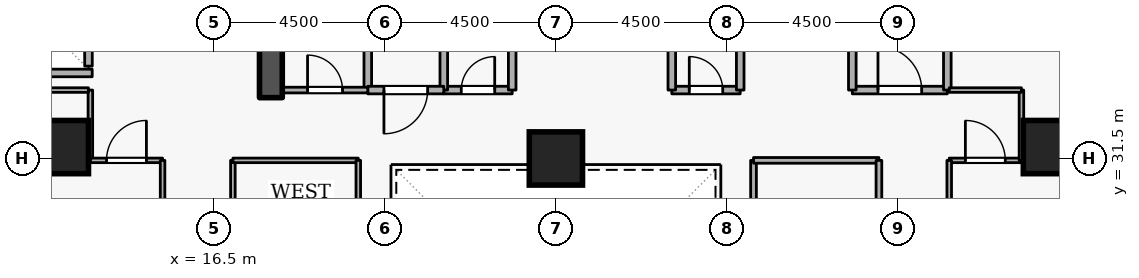
"""IFC4 building model, lengths in metres.
Left out: names, types, materials, properties, quantities, classifications, styles, units other than length and angle.
Written with IfcOpenShell. Run it as: python <this file> out.ifc"""

import sys

from ifc_helpers import new_model, si_unit, direction, frame, frame_2d, origin, origin_2d, place, context, subcontext, project, spatial, rectangle, extrude, element, fill, save


model = new_model("IFC4")
c1 = context("Model", 3, precision=1e-05, world=origin(), true_north=direction((0.0, 1.0)))
c2 = subcontext(c1, "Body", "Model", "MODEL_VIEW")
j1 = project(units=[si_unit("LENGTHUNIT", "METRE"), si_unit("PLANEANGLEUNIT", "RADIAN")], contexts=[c1])
p1 = place(None, origin())
s1 = spatial("IfcSite", under=j1, at=p1, CompositionType="ELEMENT")
p2 = place(p1, origin())
s2 = spatial("IfcBuilding", under=s1, at=p2, CompositionType="ELEMENT")
p3 = place(p2, frame((0.0, 0.0, 38.7)))
s3 = spatial("IfcBuildingStorey", under=s2, at=p3, CompositionType="ELEMENT", Elevation=38.7)
p4 = place(p3, frame((18.0, 33.1, 0.0), z_axis=(0.0, 0.0, 1.0), x_axis=(0.0, 1.0, 0.0)))
e1 = element("IfcWall", 1, at=p4, inside=s3, PredefinedType="SHEAR", context=c2, shape_type="SweptSolid", body=[
    extrude(rectangle(XDim=5.7, YDim=0.6, at=frame_2d((2.85, 0.0))), origin(), (0.0, 0.0, 1.0), 3.6),
])
for number, where, z_axis, x_axis in (
    (2, (12.5, 31.8, 0.0), (0.0, 0.0, 1.0), (1.0, 0.0, 0.0)),
    (3, (38.5, 31.8, 0.0), (0.0, 0.0, 1.0), (1.0, 0.0, 0.0)),
    (4, (25.5, 31.5, 0.0), (0.0, 0.0, 1.0), (1.0, 0.0, 0.0)),
):
    element("IfcColumn", number, at=place(p3, frame(where, z_axis=z_axis, x_axis=x_axis)), inside=s3, PredefinedType="COLUMN", context=c2, shape_type="SweptSolid", body=[
        extrude(rectangle(XDim=1.4, YDim=1.4, at=origin_2d()), origin(), (0.0, 0.0, 1.0), 3.6),
    ])
p5 = place(p3, frame((13.2, 33.93, 0.0), z_axis=(0.0, 0.0, 1.0), x_axis=(0.0, 1.0, 0.0)))
e5 = element("IfcWall", 5, at=p5, inside=s3, PredefinedType="STANDARD", context=c2, shape_type="SweptSolid", body=[
    extrude(rectangle(XDim=1.94, YDim=0.2, at=frame_2d((0.97, 0.0))), origin(), (0.0, 0.0, 1.0), 3.34),
])
p6 = place(p3, frame((11.002, 33.75, 0.0), z_axis=(0.0, 0.0, 1.0), x_axis=(1.0, 0.0, 0.0)))
e6 = element("IfcWall", 6, at=p6, inside=s3, PredefinedType="STANDARD", context=c2, shape_type="SweptSolid", body=[
    extrude(rectangle(XDim=2.296, YDim=0.2, at=frame_2d((1.148, 0.0))), origin(), (0.0, 0.0, 1.0), 3.34),
])
p7 = place(p3, frame((33.3, 33.3, 0.0), z_axis=(0.0, 0.0, 1.0), x_axis=(1.0, 0.0, 0.0)))
e7 = element("IfcWall", 7, at=p7, inside=s3, PredefinedType="STANDARD", context=c2, shape_type="SweptSolid", body=[
    extrude(rectangle(XDim=2.5, YDim=0.2, at=frame_2d((1.25, 0.0))), origin(), (0.0, 0.0, 1.0), 3.34),
])
p8 = place(p7, frame((0.675, 0.0, 0.0)))
e8 = element("IfcOpeningElement", 8, at=p8, cuts=e7, PredefinedType="OPENING", context=c2, shape_type="SweptSolid", body=[
    extrude(rectangle(XDim=1.15, YDim=2.1, at=frame_2d((0.575, 1.05))), frame((0.0, 0.11, 0.0), z_axis=(0.0, -1.0, 0.0), x_axis=(1.0, 0.0, 0.0)), (0.0, 0.0, 1.0), 0.22),
])
p9 = place(p3, frame((35.8, 33.3, 0.0), z_axis=(0.0, 0.0, 1.0), x_axis=(0.0, 1.0, 0.0)))
e9 = element("IfcWall", 9, at=p9, inside=s3, PredefinedType="STANDARD", context=c2, shape_type="SweptSolid", body=[
    extrude(rectangle(XDim=5.7, YDim=0.2, at=frame_2d((2.85, 0.0))), origin(), (0.0, 0.0, 1.0), 3.34),
])
p10 = place(p3, frame((33.3, 35.6, 0.0), z_axis=(0.0, 0.0, 1.0), x_axis=(0.0, -1.0, 0.0)))
e10 = element("IfcWall", 10, at=p10, inside=s3, PredefinedType="STANDARD", context=c2, shape_type="SweptSolid", body=[
    extrude(rectangle(XDim=2.3, YDim=0.2, at=frame_2d((1.15, 0.0))), origin(), (0.0, 0.0, 1.0), 2.545),
])
p11 = place(p3, frame((22.55, 33.3, 0.0), z_axis=(0.0, 0.0, 1.0), x_axis=(1.0, 0.0, 0.0)))
e11 = element("IfcWall", 11, at=p11, inside=s3, PredefinedType="STANDARD", context=c2, shape_type="SweptSolid", body=[
    extrude(rectangle(XDim=1.8, YDim=0.2, at=frame_2d((0.9, 0.0))), origin(), (0.0, 0.0, 1.0), 3.34),
])
p12 = place(p11, frame((0.46, 0.0, 0.0)))
e12 = element("IfcOpeningElement", 12, at=p12, cuts=e11, PredefinedType="OPENING", context=c2, shape_type="SweptSolid", body=[
    extrude(rectangle(XDim=0.88, YDim=2.04, at=frame_2d((0.44, 1.02))), frame((0.0, 0.11, 0.0), z_axis=(0.0, -1.0, 0.0), x_axis=(1.0, 0.0, 0.0)), (0.0, 0.0, 1.0), 0.22),
])
for number, where, z_axis, x_axis in (
    (13, (24.35, 33.3, 0.0), (0.0, 0.0, 1.0), (0.0, 1.0, 0.0)),
    (14, (22.55, 35.35, 0.0), (0.0, 0.0, 1.0), (0.0, -1.0, 0.0)),
):
    element("IfcWall", number, at=place(p3, frame(where, z_axis=z_axis, x_axis=x_axis)), inside=s3, PredefinedType="STANDARD", context=c2, shape_type="SweptSolid", body=[
        extrude(rectangle(XDim=2.05, YDim=0.2, at=frame_2d((1.025, 0.0))), origin(), (0.0, 0.0, 1.0), 3.34),
    ])
p13 = place(p3, frame((28.55, 33.3, 0.0), z_axis=(0.0, 0.0, 1.0), x_axis=(1.0, 0.0, 0.0)))
e15 = element("IfcWall", 15, at=p13, inside=s3, PredefinedType="STANDARD", context=c2, shape_type="SweptSolid", body=[
    extrude(rectangle(XDim=1.8, YDim=0.2, at=frame_2d((0.9, 0.0))), origin(), (0.0, 0.0, 1.0), 3.34),
])
p14 = place(p13, frame((0.46, 0.0, 0.0)))
e16 = element("IfcOpeningElement", 16, at=p14, cuts=e15, PredefinedType="OPENING", context=c2, shape_type="SweptSolid", body=[
    extrude(rectangle(XDim=0.88, YDim=2.04, at=frame_2d((0.44, 1.02))), frame((0.0, 0.11, 0.0), z_axis=(0.0, -1.0, 0.0), x_axis=(1.0, 0.0, 0.0)), (0.0, 0.0, 1.0), 0.22),
])
for number, where, z_axis, x_axis in (
    (17, (30.35, 33.3, 0.0), (0.0, 0.0, 1.0), (0.0, 1.0, 0.0)),
    (18, (28.55, 35.35, 0.0), (0.0, 0.0, 1.0), (0.0, -1.0, 0.0)),
    (19, (20.55, 33.3, 0.0), (0.0, 0.0, 1.0), (0.0, 1.0, 0.0)),
):
    element("IfcWall", number, at=place(p3, frame(where, z_axis=z_axis, x_axis=x_axis)), inside=s3, PredefinedType="STANDARD", context=c2, shape_type="SweptSolid", body=[
        extrude(rectangle(XDim=2.05, YDim=0.2, at=frame_2d((1.025, 0.0))), origin(), (0.0, 0.0, 1.0), 3.34),
    ])
p15 = place(p3, frame((22.55, 33.3, 0.0), z_axis=(0.0, 0.0, 1.0), x_axis=(-1.0, 0.0, 0.0)))
e20 = element("IfcWall", 20, at=p15, inside=s3, PredefinedType="STANDARD", context=c2, shape_type="SweptSolid", body=[
    extrude(rectangle(XDim=2.0, YDim=0.2, at=frame_2d((1.0, 0.0))), origin(), (0.0, 0.0, 1.0), 3.34),
])
p16 = place(p15, frame((0.425, 0.0, 0.0)))
e21 = element("IfcOpeningElement", 21, at=p16, cuts=e20, PredefinedType="OPENING", context=c2, shape_type="SweptSolid", body=[
    extrude(rectangle(XDim=1.15, YDim=2.1, at=frame_2d((0.575, 1.05))), frame((0.0, 0.11, 0.0), z_axis=(0.0, -1.0, 0.0), x_axis=(1.0, 0.0, 0.0)), (0.0, 0.0, 1.0), 0.22),
])
p17 = place(p3, frame((18.3, 33.3, 0.0), z_axis=(0.0, 0.0, 1.0), x_axis=(1.0, 0.0, 0.0)))
e22 = element("IfcWall", 22, at=p17, inside=s3, PredefinedType="PARTITIONING", context=c2, shape_type="SweptSolid", body=[
    extrude(rectangle(XDim=2.25, YDim=0.15, at=frame_2d((1.125, 0.0))), origin(), (0.0, 0.0, 1.0), 3.34),
])
p18 = place(p17, frame((0.665, 0.0, 0.0)))
e23 = element("IfcOpeningElement", 23, at=p18, cuts=e22, PredefinedType="OPENING", context=c2, shape_type="SweptSolid", body=[
    extrude(rectangle(XDim=0.92, YDim=2.08, at=frame_2d((0.46, 1.04))), frame((0.0, 0.085, 0.0), z_axis=(0.0, -1.0, 0.0), x_axis=(1.0, 0.0, 0.0)), (0.0, 0.0, 1.0), 0.17),
])
p19 = place(p3, frame((13.25, 33.3, 0.0), z_axis=(0.0, 0.0, 1.0), x_axis=(0.0, -1.0, 0.0)))
e24 = element("IfcWall", 24, at=p19, inside=s3, PredefinedType="PARTITIONING", context=c2, shape_type="SweptSolid", body=[
    extrude(rectangle(XDim=1.85, YDim=0.12, at=frame_2d((0.925, 0.0))), origin(), (0.0, 0.0, 1.0), 3.34),
])
p20 = place(p3, frame((13.25, 31.45, 0.0), z_axis=(0.0, 0.0, 1.0), x_axis=(1.0, 0.0, 0.0)))
e25 = element("IfcWall", 25, at=p20, inside=s3, PredefinedType="PARTITIONING", context=c2, shape_type="SweptSolid", body=[
    extrude(rectangle(XDim=1.9, YDim=0.12, at=frame_2d((0.95, 0.0))), origin(), (0.0, 0.0, 1.0), 3.34),
])
p21 = place(p20, frame((0.425, 0.0, 0.0)))
e26 = element("IfcOpeningElement", 26, at=p21, cuts=e25, PredefinedType="OPENING", context=c2, shape_type="SweptSolid", body=[
    extrude(rectangle(XDim=1.05, YDim=2.1, at=frame_2d((0.525, 1.05))), frame((0.0, 0.07, 0.0), z_axis=(0.0, -1.0, 0.0), x_axis=(1.0, 0.0, 0.0)), (0.0, 0.0, 1.0), 0.14),
])
p22 = place(p3, frame((15.15, 31.45, 0.0), z_axis=(0.0, 0.0, 1.0), x_axis=(0.0, -1.0, 0.0)))
e27 = element("IfcWall", 27, at=p22, inside=s3, PredefinedType="PARTITIONING", context=c2, shape_type="SweptSolid", body=[
    extrude(rectangle(XDim=1.3, YDim=0.12, at=frame_2d((0.65, 0.0))), origin(), (0.0, 0.0, 1.0), 3.34),
])
p23 = place(p3, frame((10.9, 33.3, 0.0), z_axis=(0.0, 0.0, 1.0), x_axis=(1.0, 0.0, 0.0)))
e28 = element("IfcWall", 28, at=p23, inside=s3, PredefinedType="PARTITIONING", context=c2, shape_type="SweptSolid", body=[
    extrude(rectangle(XDim=2.3, YDim=0.12, at=frame_2d((1.15, 0.0))), origin(), (0.0, 0.0, 1.0), 3.34),
])
p24 = place(p3, frame((35.85, 31.45, 0.0), z_axis=(0.0, 0.0, 1.0), x_axis=(1.0, 0.0, 0.0)))
e29 = element("IfcWall", 29, at=p24, inside=s3, PredefinedType="PARTITIONING", context=c2, shape_type="SweptSolid", body=[
    extrude(rectangle(XDim=1.9, YDim=0.12, at=frame_2d((0.95, 0.0))), origin(), (0.0, 0.0, 1.0), 3.34),
])
p25 = place(p24, frame((0.425, 0.0, 0.0)))
e30 = element("IfcOpeningElement", 30, at=p25, cuts=e29, PredefinedType="OPENING", context=c2, shape_type="SweptSolid", body=[
    extrude(rectangle(XDim=1.05, YDim=2.1, at=frame_2d((0.525, 1.05))), frame((0.0, 0.07, 0.0), z_axis=(0.0, -1.0, 0.0), x_axis=(1.0, 0.0, 0.0)), (0.0, 0.0, 1.0), 0.14),
])
p26 = place(p3, frame((37.75, 31.45, 0.0), z_axis=(0.0, 0.0, 1.0), x_axis=(0.0, 1.0, 0.0)))
e31 = element("IfcWall", 31, at=p26, inside=s3, PredefinedType="PARTITIONING", context=c2, shape_type="SweptSolid", body=[
    extrude(rectangle(XDim=1.85, YDim=0.12, at=frame_2d((0.925, 0.0))), origin(), (0.0, 0.0, 1.0), 3.34),
])
p27 = place(p3, frame((37.75, 33.3, 0.0), z_axis=(0.0, 0.0, 1.0), x_axis=(-1.0, 0.0, 0.0)))
e32 = element("IfcWall", 32, at=p27, inside=s3, PredefinedType="PARTITIONING", context=c2, shape_type="SweptSolid", body=[
    extrude(rectangle(XDim=1.9, YDim=0.12, at=frame_2d((0.95, 0.0))), origin(), (0.0, 0.0, 1.0), 3.34),
])
p28 = place(p3, frame((35.85, 30.15, 0.0), z_axis=(0.0, 0.0, 1.0), x_axis=(0.0, 1.0, 0.0)))
e33 = element("IfcWall", 33, at=p28, inside=s3, PredefinedType="PARTITIONING", context=c2, shape_type="SweptSolid", body=[
    extrude(rectangle(XDim=1.3, YDim=0.12, at=frame_2d((0.65, 0.0))), origin(), (0.0, 0.0, 1.0), 3.34),
])
p29 = place(p3, frame((30.7, 22.55, 0.0), z_axis=(0.0, 0.0, 1.0), x_axis=(0.0, 1.0, 0.0)))
e34 = element("IfcWall", 34, at=p29, inside=s3, PredefinedType="PARTITIONING", context=c2, shape_type="SweptSolid", body=[
    extrude(rectangle(XDim=8.9, YDim=0.15, at=frame_2d((4.45, 0.0))), origin(), (0.0, 0.0, 1.0), 3.34),
])
p30 = place(p3, frame((30.7, 31.45, 0.0), z_axis=(0.0, 0.0, 1.0), x_axis=(1.0, 0.0, 0.0)))
e35 = element("IfcWall", 35, at=p30, inside=s3, PredefinedType="PARTITIONING", context=c2, shape_type="SweptSolid", body=[
    extrude(rectangle(XDim=3.3, YDim=0.15, at=frame_2d((1.65, 0.0))), origin(), (0.0, 0.0, 1.0), 3.34),
])
p31 = place(p3, frame((34.0, 31.45, 0.0), z_axis=(0.0, 0.0, 1.0), x_axis=(0.0, -1.0, 0.0)))
e36 = element("IfcWall", 36, at=p31, inside=s3, PredefinedType="PARTITIONING", context=c2, shape_type="SweptSolid", body=[
    extrude(rectangle(XDim=8.9, YDim=0.15, at=frame_2d((4.45, 0.0))), origin(), (0.0, 0.0, 1.0), 3.34),
])
p32 = place(p31, frame((3.8, 0.0, 0.0)))
e37 = element("IfcOpeningElement", 37, at=p32, cuts=e36, PredefinedType="OPENING", context=c2, shape_type="SweptSolid", body=[
    extrude(rectangle(XDim=1.3, YDim=2.12, at=frame_2d((0.65, 1.06))), frame((0.0, 0.085, 0.0), z_axis=(0.0, -1.0, 0.0), x_axis=(1.0, 0.0, 0.0)), (0.0, 0.0, 1.0), 0.17),
])
p33 = place(p3, frame((17.0, 22.55, 0.0), z_axis=(0.0, 0.0, 1.0), x_axis=(0.0, 1.0, 0.0)))
e38 = element("IfcWall", 38, at=p33, inside=s3, PredefinedType="PARTITIONING", context=c2, shape_type="SweptSolid", body=[
    extrude(rectangle(XDim=8.9, YDim=0.12, at=frame_2d((4.45, 0.0))), origin(), (0.0, 0.0, 1.0), 3.34),
])
p34 = place(p33, frame((3.975, 0.0, 0.0)))
e39 = element("IfcOpeningElement", 39, at=p34, cuts=e38, PredefinedType="OPENING", context=c2, shape_type="SweptSolid", body=[
    extrude(rectangle(XDim=0.95, YDim=2.1, at=frame_2d((0.475, 1.05))), frame((0.0, 0.07, 0.0), z_axis=(0.0, -1.0, 0.0), x_axis=(1.0, 0.0, 0.0)), (0.0, 0.0, 1.0), 0.14),
])
p35 = place(p3, frame((17.0, 31.45, 0.0), z_axis=(0.0, 0.0, 1.0), x_axis=(1.0, 0.0, 0.0)))
e40 = element("IfcWall", 40, at=p35, inside=s3, PredefinedType="PARTITIONING", context=c2, shape_type="SweptSolid", body=[
    extrude(rectangle(XDim=3.3, YDim=0.12, at=frame_2d((1.65, 0.0))), origin(), (0.0, 0.0, 1.0), 3.34),
])
p36 = place(p3, frame((20.3, 31.45, 0.0), z_axis=(0.0, 0.0, 1.0), x_axis=(0.0, -1.0, 0.0)))
e41 = element("IfcWall", 41, at=p36, inside=s3, PredefinedType="PARTITIONING", context=c2, shape_type="SweptSolid", body=[
    extrude(rectangle(XDim=8.9, YDim=0.12, at=frame_2d((4.45, 0.0))), origin(), (0.0, 0.0, 1.0), 3.34),
])
p37 = place(p8, origin())
e42 = element("IfcDoor", 42, at=p37, inside=s3, OperationType="SINGLE_SWING_LEFT", PredefinedType="DOOR", context=c2, shape_type="SweptSolid", body=[
    extrude(rectangle(XDim=1.15, YDim=2.1, at=frame_2d((0.575, 1.05))), frame((0.0, 0.025, 0.0), z_axis=(0.0, -1.0, 0.0), x_axis=(1.0, 0.0, 0.0)), (0.0, 0.0, 1.0), 0.05),
])
fill(e8, e42)
p38 = place(p12, origin())
e43 = element("IfcDoor", 43, at=p38, inside=s3, OperationType="SINGLE_SWING_RIGHT", PredefinedType="DOOR", context=c2, shape_type="SweptSolid", body=[
    extrude(rectangle(XDim=0.88, YDim=2.04, at=frame_2d((0.44, 1.02))), frame((0.0, 0.025, 0.0), z_axis=(0.0, -1.0, 0.0), x_axis=(1.0, 0.0, 0.0)), (0.0, 0.0, 1.0), 0.05),
])
fill(e12, e43)
p39 = place(p14, origin())
e44 = element("IfcDoor", 44, at=p39, inside=s3, OperationType="SINGLE_SWING_LEFT", PredefinedType="DOOR", context=c2, shape_type="SweptSolid", body=[
    extrude(rectangle(XDim=0.88, YDim=2.04, at=frame_2d((0.44, 1.02))), frame((0.0, 0.025, 0.0), z_axis=(0.0, -1.0, 0.0), x_axis=(1.0, 0.0, 0.0)), (0.0, 0.0, 1.0), 0.05),
])
fill(e16, e44)
p40 = place(p18, origin())
e45 = element("IfcDoor", 45, at=p40, inside=s3, OperationType="SINGLE_SWING_LEFT", PredefinedType="DOOR", context=c2, shape_type="SweptSolid", body=[
    extrude(rectangle(XDim=0.92, YDim=2.08, at=frame_2d((0.46, 1.04))), frame((0.0, 0.025, 0.0), z_axis=(0.0, -1.0, 0.0), x_axis=(1.0, 0.0, 0.0)), (0.0, 0.0, 1.0), 0.05),
])
fill(e23, e45)
p41 = place(p16, origin())
e46 = element("IfcDoor", 46, at=p41, inside=s3, OperationType="SINGLE_SWING_RIGHT", PredefinedType="DOOR", context=c2, shape_type="SweptSolid", body=[
    extrude(rectangle(XDim=1.15, YDim=2.1, at=frame_2d((0.575, 1.05))), frame((0.0, 0.025, 0.0), z_axis=(0.0, -1.0, 0.0), x_axis=(1.0, 0.0, 0.0)), (0.0, 0.0, 1.0), 0.05),
])
fill(e21, e46)
p42 = place(p21, origin())
e47 = element("IfcDoor", 47, at=p42, inside=s3, OperationType="SINGLE_SWING_RIGHT", PredefinedType="DOOR", context=c2, shape_type="SweptSolid", body=[
    extrude(rectangle(XDim=1.05, YDim=2.1, at=frame_2d((0.525, 1.05))), frame((0.0, 0.025, 0.0), z_axis=(0.0, -1.0, 0.0), x_axis=(1.0, 0.0, 0.0)), (0.0, 0.0, 1.0), 0.05),
])
fill(e26, e47)
p43 = place(p25, origin())
e48 = element("IfcDoor", 48, at=p43, inside=s3, OperationType="SINGLE_SWING_LEFT", PredefinedType="DOOR", context=c2, shape_type="SweptSolid", body=[
    extrude(rectangle(XDim=1.05, YDim=2.1, at=frame_2d((0.525, 1.05))), frame((0.0, 0.025, 0.0), z_axis=(0.0, -1.0, 0.0), x_axis=(1.0, 0.0, 0.0)), (0.0, 0.0, 1.0), 0.05),
])
fill(e30, e48)
save(model, sys.argv[1])
